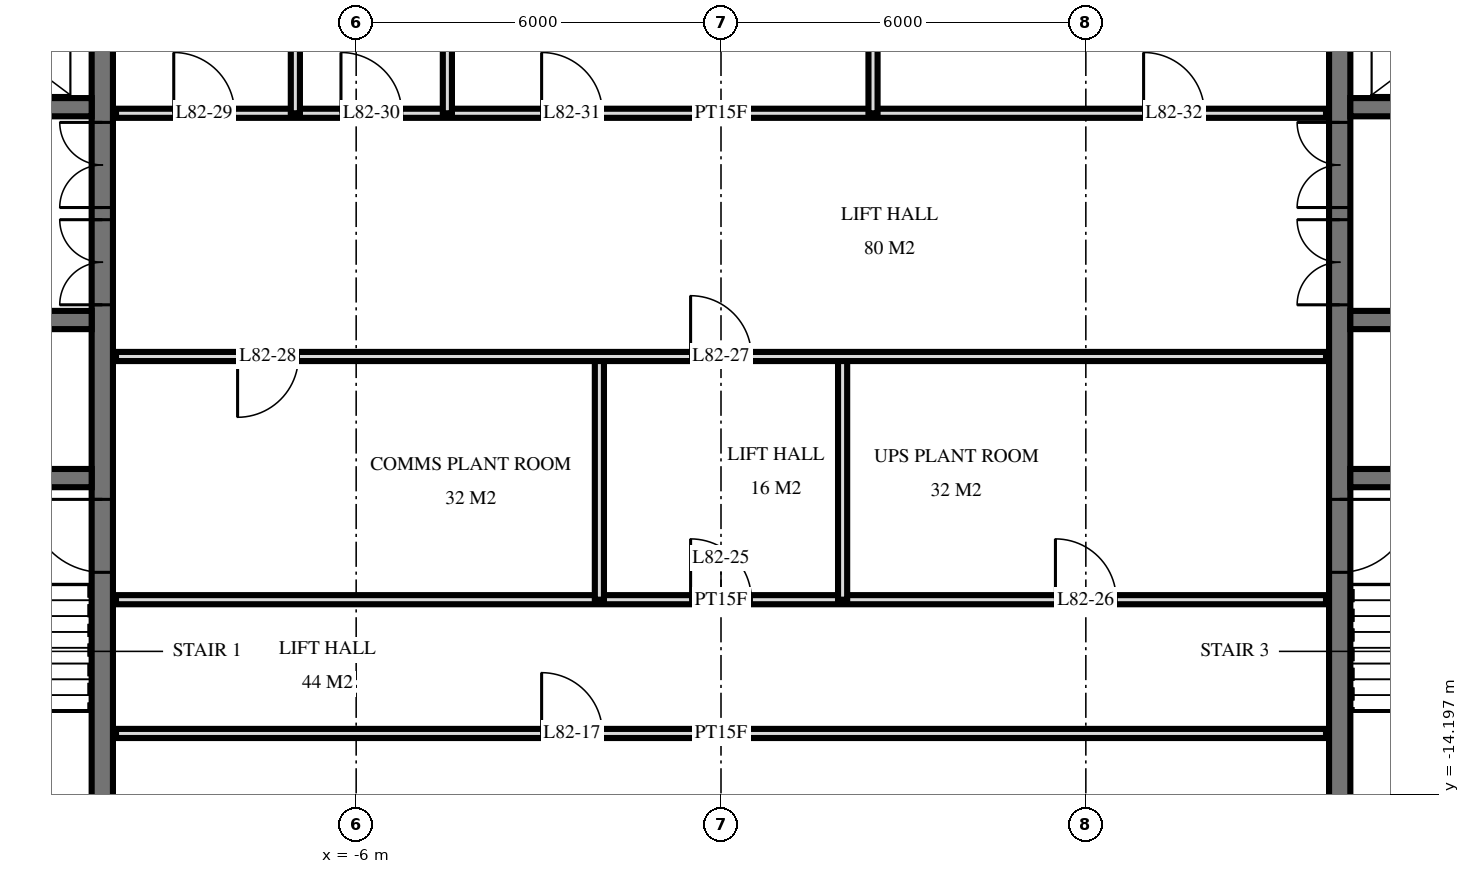
"""IFC4 building model, lengths in metres.
Left out: names, types, materials, properties, quantities, classifications, styles, units other than length and angle.
Written with IfcOpenShell. Run it as: python <this file> out.ifc"""

import sys

from ifc_helpers import new_model, si_unit, direction, frame, frame_2d, origin, place, context, subcontext, project, spatial, rectangle, extrude, element, fill, save


model = new_model("IFC4")
c1 = context("Model", 3, precision=1e-05, world=origin(), true_north=direction((0.0, 1.0)))
c2 = subcontext(c1, "Body", "Model", "MODEL_VIEW")
j1 = project(units=[si_unit("LENGTHUNIT", "METRE"), si_unit("PLANEANGLEUNIT", "RADIAN")], contexts=[c1])
p1 = place(None, origin())
s1 = spatial("IfcSite", under=j1, at=p1, CompositionType="ELEMENT")
p2 = place(p1, origin())
s2 = spatial("IfcBuilding", under=s1, at=p2, CompositionType="ELEMENT")
p3 = place(p2, frame((0.0, 0.0, 308.6)))
s3 = spatial("IfcBuildingStorey", under=s2, at=p3, CompositionType="ELEMENT", Elevation=308.6)
p4 = place(p3, frame((-10.175, -14.55, 0.0), z_axis=(0.0, 0.0, 1.0), x_axis=(0.0, 1.0, 0.0)))
e1 = element("IfcWall", 1, at=p4, inside=s3, PredefinedType="SHEAR", context=c2, shape_type="SweptSolid", body=[
    extrude(rectangle(XDim=14.1, YDim=0.35, at=frame_2d((7.05, 0.0))), origin(), (0.0, 0.0, 1.0), 6.0),
])
p5 = place(p4, frame((8.4, 0.0, 0.0)))
e2 = element("IfcOpeningElement", 2, at=p5, cuts=e1, PredefinedType="OPENING", context=c2, shape_type="SweptSolid", body=[
    extrude(rectangle(XDim=1.4, YDim=2.4, at=frame_2d((0.7, 1.2))), frame((0.0, 0.185, 0.0), z_axis=(0.0, -1.0, 0.0), x_axis=(1.0, 0.0, 0.0)), (0.0, 0.0, 1.0), 0.37),
])
p6 = place(p4, frame((10.0, 0.0, 0.0)))
e3 = element("IfcOpeningElement", 3, at=p6, cuts=e1, PredefinedType="OPENING", context=c2, shape_type="SweptSolid", body=[
    extrude(rectangle(XDim=1.4, YDim=2.4, at=frame_2d((0.7, 1.2))), frame((0.0, 0.185, 0.0), z_axis=(0.0, -1.0, 0.0), x_axis=(1.0, 0.0, 0.0)), (0.0, 0.0, 1.0), 0.37),
])
p7 = place(p4, frame((4.0, 0.0, 0.0)))
e4 = element("IfcOpeningElement", 4, at=p7, cuts=e1, PredefinedType="OPENING", context=c2, shape_type="SweptSolid", body=[
    extrude(rectangle(XDim=1.2, YDim=2.1, at=frame_2d((0.6, 1.05))), frame((0.0, 0.185, 0.0), z_axis=(0.0, -1.0, 0.0), x_axis=(1.0, 0.0, 0.0)), (0.0, 0.0, 1.0), 0.37),
])
p8 = place(p3, frame((-19.05, -2.9, 0.0), z_axis=(0.0, 0.0, 1.0), x_axis=(1.0, 0.0, 0.0)))
e5 = element("IfcWall", 5, at=p8, inside=s3, PredefinedType="SHEAR", context=c2, shape_type="SweptSolid", body=[
    extrude(rectangle(XDim=8.7, YDim=0.3, at=frame_2d((4.35, 0.0))), origin(), (0.0, 0.0, 1.0), 6.0),
])
p9 = place(p8, frame((6.8, 0.0, 0.0)))
e6 = element("IfcOpeningElement", 6, at=p9, cuts=e5, PredefinedType="OPENING", context=c2, shape_type="SweptSolid", body=[
    extrude(rectangle(XDim=1.1, YDim=2.1, at=frame_2d((0.55, 1.05))), frame((0.0, 0.16, 0.0), z_axis=(0.0, -1.0, 0.0), x_axis=(1.0, 0.0, 0.0)), (0.0, 0.0, 1.0), 0.32),
])
p10 = place(p8, frame((3.8, 0.0, 0.0)))
e7 = element("IfcOpeningElement", 7, at=p10, cuts=e5, PredefinedType="OPENING", context=c2, shape_type="SweptSolid", body=[
    extrude(rectangle(XDim=1.1, YDim=2.1, at=frame_2d((0.55, 1.05))), frame((0.0, 0.16, 0.0), z_axis=(0.0, -1.0, 0.0), x_axis=(1.0, 0.0, 0.0)), (0.0, 0.0, 1.0), 0.32),
])
p11 = place(p8, frame((0.9, 0.0, 0.0)))
e8 = element("IfcOpeningElement", 8, at=p11, cuts=e5, PredefinedType="OPENING", context=c2, shape_type="SweptSolid", body=[
    extrude(rectangle(XDim=0.9, YDim=2.1, at=frame_2d((0.45, 1.05))), frame((0.0, 0.16, 0.0), z_axis=(0.0, -1.0, 0.0), x_axis=(1.0, 0.0, 0.0)), (0.0, 0.0, 1.0), 0.32),
])
p12 = place(p3, frame((-19.05, -6.4, 0.0), z_axis=(0.0, 0.0, 1.0), x_axis=(1.0, 0.0, 0.0)))
e9 = element("IfcWall", 9, at=p12, inside=s3, PredefinedType="SHEAR", context=c2, shape_type="SweptSolid", body=[
    extrude(rectangle(XDim=8.7, YDim=0.3, at=frame_2d((4.35, 0.0))), origin(), (0.0, 0.0, 1.0), 6.0),
])
p13 = place(p12, frame((0.8, 0.0, 0.0)))
e10 = element("IfcOpeningElement", 10, at=p13, cuts=e9, PredefinedType="OPENING", context=c2, shape_type="SweptSolid", body=[
    extrude(rectangle(XDim=1.1, YDim=2.1, at=frame_2d((0.55, 1.05))), frame((0.0, 0.16, 0.0), z_axis=(0.0, -1.0, 0.0), x_axis=(1.0, 0.0, 0.0)), (0.0, 0.0, 1.0), 0.32),
])
p14 = place(p3, frame((-19.05, -9.0, 0.0), z_axis=(0.0, 0.0, 1.0), x_axis=(1.0, 0.0, 0.0)))
e11 = element("IfcWall", 11, at=p14, inside=s3, PredefinedType="SHEAR", context=c2, shape_type="SweptSolid", body=[
    extrude(rectangle(XDim=8.7, YDim=0.3, at=frame_2d((4.35, 0.0))), origin(), (0.0, 0.0, 1.0), 6.0),
])
p15 = place(p14, frame((3.8, 0.0, 0.0)))
e12 = element("IfcOpeningElement", 12, at=p15, cuts=e11, PredefinedType="OPENING", context=c2, shape_type="SweptSolid", body=[
    extrude(rectangle(XDim=1.1, YDim=2.1, at=frame_2d((0.55, 1.05))), frame((0.0, 0.16, 0.0), z_axis=(0.0, -1.0, 0.0), x_axis=(1.0, 0.0, 0.0)), (0.0, 0.0, 1.0), 0.32),
])
p16 = place(p3, frame((10.175, -14.55, 0.0), z_axis=(0.0, 0.0, 1.0), x_axis=(0.0, 1.0, 0.0)))
e13 = element("IfcWall", 13, at=p16, inside=s3, PredefinedType="SHEAR", context=c2, shape_type="SweptSolid", body=[
    extrude(rectangle(XDim=14.1, YDim=0.35, at=frame_2d((7.05, 0.0))), origin(), (0.0, 0.0, 1.0), 6.0),
])
p17 = place(p16, frame((8.4, 0.0, 0.0)))
e14 = element("IfcOpeningElement", 14, at=p17, cuts=e13, PredefinedType="OPENING", context=c2, shape_type="SweptSolid", body=[
    extrude(rectangle(XDim=1.4, YDim=2.4, at=frame_2d((0.7, 1.2))), frame((0.0, 0.185, 0.0), z_axis=(0.0, -1.0, 0.0), x_axis=(1.0, 0.0, 0.0)), (0.0, 0.0, 1.0), 0.37),
])
p18 = place(p16, frame((10.0, 0.0, 0.0)))
e15 = element("IfcOpeningElement", 15, at=p18, cuts=e13, PredefinedType="OPENING", context=c2, shape_type="SweptSolid", body=[
    extrude(rectangle(XDim=1.4, YDim=2.4, at=frame_2d((0.7, 1.2))), frame((0.0, 0.185, 0.0), z_axis=(0.0, -1.0, 0.0), x_axis=(1.0, 0.0, 0.0)), (0.0, 0.0, 1.0), 0.37),
])
p19 = place(p16, frame((4.0, 0.0, 0.0)))
e16 = element("IfcOpeningElement", 16, at=p19, cuts=e13, PredefinedType="OPENING", context=c2, shape_type="SweptSolid", body=[
    extrude(rectangle(XDim=1.2, YDim=2.1, at=frame_2d((0.6, 1.05))), frame((0.0, 0.185, 0.0), z_axis=(0.0, -1.0, 0.0), x_axis=(1.0, 0.0, 0.0)), (0.0, 0.0, 1.0), 0.37),
])
p20 = place(p3, frame((10.35, -2.9, 0.0), z_axis=(0.0, 0.0, 1.0), x_axis=(1.0, 0.0, 0.0)))
e17 = element("IfcWall", 17, at=p20, inside=s3, PredefinedType="SHEAR", context=c2, shape_type="SweptSolid", body=[
    extrude(rectangle(XDim=8.7, YDim=0.3, at=frame_2d((4.35, 0.0))), origin(), (0.0, 0.0, 1.0), 6.0),
])
p21 = place(p20, frame((0.8, 0.0, 0.0)))
e18 = element("IfcOpeningElement", 18, at=p21, cuts=e17, PredefinedType="OPENING", context=c2, shape_type="SweptSolid", body=[
    extrude(rectangle(XDim=1.1, YDim=2.1, at=frame_2d((0.55, 1.05))), frame((0.0, 0.16, 0.0), z_axis=(0.0, -1.0, 0.0), x_axis=(1.0, 0.0, 0.0)), (0.0, 0.0, 1.0), 0.32),
])
p22 = place(p20, frame((3.8, 0.0, 0.0)))
e19 = element("IfcOpeningElement", 19, at=p22, cuts=e17, PredefinedType="OPENING", context=c2, shape_type="SweptSolid", body=[
    extrude(rectangle(XDim=1.1, YDim=2.1, at=frame_2d((0.55, 1.05))), frame((0.0, 0.16, 0.0), z_axis=(0.0, -1.0, 0.0), x_axis=(1.0, 0.0, 0.0)), (0.0, 0.0, 1.0), 0.32),
])
p23 = place(p20, frame((6.9, 0.0, 0.0)))
e20 = element("IfcOpeningElement", 20, at=p23, cuts=e17, PredefinedType="OPENING", context=c2, shape_type="SweptSolid", body=[
    extrude(rectangle(XDim=0.9, YDim=2.1, at=frame_2d((0.45, 1.05))), frame((0.0, 0.16, 0.0), z_axis=(0.0, -1.0, 0.0), x_axis=(1.0, 0.0, 0.0)), (0.0, 0.0, 1.0), 0.32),
])
p24 = place(p3, frame((10.35, -6.4, 0.0), z_axis=(0.0, 0.0, 1.0), x_axis=(1.0, 0.0, 0.0)))
e21 = element("IfcWall", 21, at=p24, inside=s3, PredefinedType="SHEAR", context=c2, shape_type="SweptSolid", body=[
    extrude(rectangle(XDim=8.7, YDim=0.3, at=frame_2d((4.35, 0.0))), origin(), (0.0, 0.0, 1.0), 6.0),
])
p25 = place(p24, frame((6.8, 0.0, 0.0)))
e22 = element("IfcOpeningElement", 22, at=p25, cuts=e21, PredefinedType="OPENING", context=c2, shape_type="SweptSolid", body=[
    extrude(rectangle(XDim=1.1, YDim=2.1, at=frame_2d((0.55, 1.05))), frame((0.0, 0.16, 0.0), z_axis=(0.0, -1.0, 0.0), x_axis=(1.0, 0.0, 0.0)), (0.0, 0.0, 1.0), 0.32),
])
p26 = place(p3, frame((10.35, -9.0, 0.0), z_axis=(0.0, 0.0, 1.0), x_axis=(1.0, 0.0, 0.0)))
e23 = element("IfcWall", 23, at=p26, inside=s3, PredefinedType="SHEAR", context=c2, shape_type="SweptSolid", body=[
    extrude(rectangle(XDim=8.7, YDim=0.3, at=frame_2d((4.35, 0.0))), origin(), (0.0, 0.0, 1.0), 6.0),
])
p27 = place(p26, frame((3.8, 0.0, 0.0)))
e24 = element("IfcOpeningElement", 24, at=p27, cuts=e23, PredefinedType="OPENING", context=c2, shape_type="SweptSolid", body=[
    extrude(rectangle(XDim=1.1, YDim=2.1, at=frame_2d((0.55, 1.05))), frame((0.0, 0.16, 0.0), z_axis=(0.0, -1.0, 0.0), x_axis=(1.0, 0.0, 0.0)), (0.0, 0.0, 1.0), 0.32),
])
p28 = place(p3, frame((2.5, -3.0, 0.0), z_axis=(0.0, 0.0, 1.0), x_axis=(0.0, 1.0, 0.0)))
e25 = element("IfcWall", 25, at=p28, inside=s3, PredefinedType="PARTITIONING", context=c2, shape_type="SweptSolid", body=[
    extrude(rectangle(XDim=6.749, YDim=0.15, at=frame_2d((3.375, 0.0))), origin(), (0.0, 0.0, 1.0), 5.7),
])
for number, where, z_axis, x_axis in (
    (26, (2.0, -11.0, 0.0), (0.0, 0.0, 1.0), (0.0, 1.0, 0.0)),
    (27, (-2.0, -11.0, 0.0), (0.0, 0.0, 1.0), (0.0, 1.0, 0.0)),
):
    element("IfcWall", number, at=place(p3, frame(where, z_axis=z_axis, x_axis=x_axis)), inside=s3, PredefinedType="PARTITIONING", context=c2, shape_type="SweptSolid", body=[
        extrude(rectangle(XDim=4.0, YDim=0.15, at=frame_2d((2.0, 0.0))), origin(), (0.0, 0.0, 1.0), 5.7),
    ])
p29 = place(p3, frame((-4.5, -3.0, 0.0), z_axis=(0.0, 0.0, 1.0), x_axis=(0.0, 1.0, 0.0)))
e28 = element("IfcWall", 28, at=p29, inside=s3, PredefinedType="PLUMBINGWALL", context=c2, shape_type="SweptSolid", body=[
    extrude(rectangle(XDim=5.889, YDim=0.15, at=frame_2d((2.945, 0.0))), origin(), (0.0, 0.0, 1.0), 5.7),
])
p30 = place(p3, frame((-7.0, -3.0, 0.0), z_axis=(0.0, 0.0, 1.0), x_axis=(0.0, 1.0, 0.0)))
e29 = element("IfcWall", 29, at=p30, inside=s3, PredefinedType="PLUMBINGWALL", context=c2, shape_type="SweptSolid", body=[
    extrude(rectangle(XDim=5.583, YDim=0.15, at=frame_2d((2.791, 0.0))), origin(), (0.0, 0.0, 1.0), 5.7),
])
p31 = place(p3, frame((-9.95, -13.2, 0.0), z_axis=(0.0, 0.0, 1.0), x_axis=(1.0, 0.0, 0.0)))
e30 = element("IfcWall", 30, at=p31, inside=s3, PredefinedType="PARTITIONING", context=c2, shape_type="SweptSolid", body=[
    extrude(rectangle(XDim=19.9, YDim=0.15, at=frame_2d((9.95, 0.0))), origin(), (0.0, 0.0, 1.0), 5.7),
])
p32 = place(p31, frame((7.0, 0.0, 0.0)))
e31 = element("IfcOpeningElement", 31, at=p32, cuts=e30, PredefinedType="OPENING", context=c2, shape_type="SweptSolid", body=[
    extrude(rectangle(XDim=1.0, YDim=2.1, at=frame_2d((0.5, 1.05))), frame((0.0, 0.085, 0.0), z_axis=(0.0, -1.0, 0.0), x_axis=(1.0, 0.0, 0.0)), (0.0, 0.0, 1.0), 0.17),
])
p33 = place(p3, frame((-9.95, -11.0, 0.0), z_axis=(0.0, 0.0, 1.0), x_axis=(1.0, 0.0, 0.0)))
e32 = element("IfcWall", 32, at=p33, inside=s3, PredefinedType="PARTITIONING", context=c2, shape_type="SweptSolid", body=[
    extrude(rectangle(XDim=19.9, YDim=0.15, at=frame_2d((9.95, 0.0))), origin(), (0.0, 0.0, 1.0), 5.7),
])
p34 = place(p33, frame((9.45, 0.0, 0.0)))
e33 = element("IfcOpeningElement", 33, at=p34, cuts=e32, PredefinedType="OPENING", context=c2, shape_type="SweptSolid", body=[
    extrude(rectangle(XDim=1.0, YDim=2.1, at=frame_2d((0.5, 1.05))), frame((0.0, 0.085, 0.0), z_axis=(0.0, -1.0, 0.0), x_axis=(1.0, 0.0, 0.0)), (0.0, 0.0, 1.0), 0.17),
])
p35 = place(p33, frame((15.45, 0.0, 0.0)))
e34 = element("IfcOpeningElement", 34, at=p35, cuts=e32, PredefinedType="OPENING", context=c2, shape_type="SweptSolid", body=[
    extrude(rectangle(XDim=1.0, YDim=2.1, at=frame_2d((0.5, 1.05))), frame((0.0, 0.085, 0.0), z_axis=(0.0, -1.0, 0.0), x_axis=(1.0, 0.0, 0.0)), (0.0, 0.0, 1.0), 0.17),
])
p36 = place(p3, frame((-9.95, -7.0, 0.0), z_axis=(0.0, 0.0, 1.0), x_axis=(1.0, 0.0, 0.0)))
e35 = element("IfcWall", 35, at=p36, inside=s3, PredefinedType="PARTITIONING", context=c2, shape_type="SweptSolid", body=[
    extrude(rectangle(XDim=19.9, YDim=0.15, at=frame_2d((9.95, 0.0))), origin(), (0.0, 0.0, 1.0), 5.7),
])
p37 = place(p36, frame((9.45, 0.0, 0.0)))
e36 = element("IfcOpeningElement", 36, at=p37, cuts=e35, PredefinedType="OPENING", context=c2, shape_type="SweptSolid", body=[
    extrude(rectangle(XDim=1.0, YDim=2.1, at=frame_2d((0.5, 1.05))), frame((0.0, 0.085, 0.0), z_axis=(0.0, -1.0, 0.0), x_axis=(1.0, 0.0, 0.0)), (0.0, 0.0, 1.0), 0.17),
])
p38 = place(p36, frame((2.0, 0.0, 0.0)))
e37 = element("IfcOpeningElement", 37, at=p38, cuts=e35, PredefinedType="OPENING", context=c2, shape_type="SweptSolid", body=[
    extrude(rectangle(XDim=1.0, YDim=2.1, at=frame_2d((0.5, 1.05))), frame((0.0, 0.085, 0.0), z_axis=(0.0, -1.0, 0.0), x_axis=(1.0, 0.0, 0.0)), (0.0, 0.0, 1.0), 0.17),
])
p39 = place(p3, frame((-9.95, -3.0, 0.0), z_axis=(0.0, 0.0, 1.0), x_axis=(1.0, 0.0, 0.0)))
e38 = element("IfcWall", 38, at=p39, inside=s3, PredefinedType="PARTITIONING", context=c2, shape_type="SweptSolid", body=[
    extrude(rectangle(XDim=19.9, YDim=0.15, at=frame_2d((9.95, 0.0))), origin(), (0.0, 0.0, 1.0), 5.7),
])
p40 = place(p39, frame((0.95, 0.0, 0.0)))
e39 = element("IfcOpeningElement", 39, at=p40, cuts=e38, PredefinedType="OPENING", context=c2, shape_type="SweptSolid", body=[
    extrude(rectangle(XDim=1.0, YDim=2.1, at=frame_2d((0.5, 1.05))), frame((0.0, 0.085, 0.0), z_axis=(0.0, -1.0, 0.0), x_axis=(1.0, 0.0, 0.0)), (0.0, 0.0, 1.0), 0.17),
])
p41 = place(p39, frame((3.7, 0.0, 0.0)))
e40 = element("IfcOpeningElement", 40, at=p41, cuts=e38, PredefinedType="OPENING", context=c2, shape_type="SweptSolid", body=[
    extrude(rectangle(XDim=1.0, YDim=2.1, at=frame_2d((0.5, 1.05))), frame((0.0, 0.085, 0.0), z_axis=(0.0, -1.0, 0.0), x_axis=(1.0, 0.0, 0.0)), (0.0, 0.0, 1.0), 0.17),
])
p42 = place(p39, frame((7.0, 0.0, 0.0)))
e41 = element("IfcOpeningElement", 41, at=p42, cuts=e38, PredefinedType="OPENING", context=c2, shape_type="SweptSolid", body=[
    extrude(rectangle(XDim=1.0, YDim=2.1, at=frame_2d((0.5, 1.05))), frame((0.0, 0.085, 0.0), z_axis=(0.0, -1.0, 0.0), x_axis=(1.0, 0.0, 0.0)), (0.0, 0.0, 1.0), 0.17),
])
p43 = place(p39, frame((16.9, 0.0, 0.0)))
e42 = element("IfcOpeningElement", 42, at=p43, cuts=e38, PredefinedType="OPENING", context=c2, shape_type="SweptSolid", body=[
    extrude(rectangle(XDim=1.0, YDim=2.1, at=frame_2d((0.5, 1.05))), frame((0.0, 0.085, 0.0), z_axis=(0.0, -1.0, 0.0), x_axis=(1.0, 0.0, 0.0)), (0.0, 0.0, 1.0), 0.17),
])
p44 = place(p5, origin())
e43 = element("IfcDoor", 43, at=p44, inside=s3, OperationType="DOUBLE_DOOR_SINGLE_SWING", PredefinedType="DOOR", context=c2, shape_type="SweptSolid", body=[
    extrude(rectangle(XDim=1.4, YDim=2.4, at=frame_2d((0.7, 1.2))), frame((0.0, 0.025, 0.0), z_axis=(0.0, -1.0, 0.0), x_axis=(1.0, 0.0, 0.0)), (0.0, 0.0, 1.0), 0.05),
])
fill(e2, e43)
p45 = place(p6, origin())
e44 = element("IfcDoor", 44, at=p45, inside=s3, OperationType="DOUBLE_DOOR_SINGLE_SWING", PredefinedType="DOOR", context=c2, shape_type="SweptSolid", body=[
    extrude(rectangle(XDim=1.4, YDim=2.4, at=frame_2d((0.7, 1.2))), frame((0.0, 0.025, 0.0), z_axis=(0.0, -1.0, 0.0), x_axis=(1.0, 0.0, 0.0)), (0.0, 0.0, 1.0), 0.05),
])
fill(e3, e44)
p46 = place(p7, origin())
e45 = element("IfcDoor", 45, at=p46, inside=s3, OperationType="SINGLE_SWING_LEFT", PredefinedType="DOOR", context=c2, shape_type="SweptSolid", body=[
    extrude(rectangle(XDim=1.2, YDim=2.1, at=frame_2d((0.6, 1.05))), frame((0.0, 0.025, 0.0), z_axis=(0.0, -1.0, 0.0), x_axis=(1.0, 0.0, 0.0)), (0.0, 0.0, 1.0), 0.05),
])
fill(e4, e45)
p47 = place(p17, origin())
e46 = element("IfcDoor", 46, at=p47, inside=s3, OperationType="DOUBLE_DOOR_SINGLE_SWING", PredefinedType="DOOR", context=c2, shape_type="SweptSolid", body=[
    extrude(rectangle(XDim=1.4, YDim=2.4, at=frame_2d((0.7, 1.2))), frame((0.0, 0.025, 0.0), z_axis=(0.0, -1.0, 0.0), x_axis=(1.0, 0.0, 0.0)), (0.0, 0.0, 1.0), 0.05),
])
fill(e14, e46)
p48 = place(p18, origin())
e47 = element("IfcDoor", 47, at=p48, inside=s3, OperationType="DOUBLE_DOOR_SINGLE_SWING", PredefinedType="DOOR", context=c2, shape_type="SweptSolid", body=[
    extrude(rectangle(XDim=1.4, YDim=2.4, at=frame_2d((0.7, 1.2))), frame((0.0, 0.025, 0.0), z_axis=(0.0, -1.0, 0.0), x_axis=(1.0, 0.0, 0.0)), (0.0, 0.0, 1.0), 0.05),
])
fill(e15, e47)
p49 = place(p19, frame((0.6, 0.0, 0.0), z_axis=(0.0, 0.0, 1.0), x_axis=(-1.0, 0.0, 0.0)))
e48 = element("IfcDoor", 48, at=p49, inside=s3, OperationType="SINGLE_SWING_RIGHT", PredefinedType="DOOR", context=c2, shape_type="SweptSolid", body=[
    extrude(rectangle(XDim=1.2, YDim=2.1, at=frame_2d((0.0, 1.05))), frame((0.0, -0.025, 0.0), z_axis=(0.0, 1.0, 0.0), x_axis=(-1.0, 0.0, 0.0)), (0.0, 0.0, 1.0), 0.05),
])
fill(e16, e48)
p50 = place(p32, origin())
e49 = element("IfcDoor", 49, at=p50, inside=s3, OperationType="SINGLE_SWING_RIGHT", PredefinedType="DOOR", context=c2, shape_type="SweptSolid", body=[
    extrude(rectangle(XDim=1.0, YDim=2.1, at=frame_2d((0.5, 1.05))), frame((0.0, 0.025, 0.0), z_axis=(0.0, -1.0, 0.0), x_axis=(1.0, 0.0, 0.0)), (0.0, 0.0, 1.0), 0.05),
])
fill(e31, e49)
p51 = place(p34, origin())
e50 = element("IfcDoor", 50, at=p51, inside=s3, OperationType="SINGLE_SWING_RIGHT", PredefinedType="DOOR", context=c2, shape_type="SweptSolid", body=[
    extrude(rectangle(XDim=1.0, YDim=2.1, at=frame_2d((0.5, 1.05))), frame((0.0, 0.025, 0.0), z_axis=(0.0, -1.0, 0.0), x_axis=(1.0, 0.0, 0.0)), (0.0, 0.0, 1.0), 0.05),
])
fill(e33, e50)
p52 = place(p35, origin())
e51 = element("IfcDoor", 51, at=p52, inside=s3, OperationType="SINGLE_SWING_RIGHT", PredefinedType="DOOR", context=c2, shape_type="SweptSolid", body=[
    extrude(rectangle(XDim=1.0, YDim=2.1, at=frame_2d((0.5, 1.05))), frame((0.0, 0.025, 0.0), z_axis=(0.0, -1.0, 0.0), x_axis=(1.0, 0.0, 0.0)), (0.0, 0.0, 1.0), 0.05),
])
fill(e34, e51)
p53 = place(p37, origin())
e52 = element("IfcDoor", 52, at=p53, inside=s3, OperationType="SINGLE_SWING_RIGHT", PredefinedType="DOOR", context=c2, shape_type="SweptSolid", body=[
    extrude(rectangle(XDim=1.0, YDim=2.1, at=frame_2d((0.5, 1.05))), frame((0.0, 0.025, 0.0), z_axis=(0.0, -1.0, 0.0), x_axis=(1.0, 0.0, 0.0)), (0.0, 0.0, 1.0), 0.05),
])
fill(e36, e52)
p54 = place(p38, frame((0.5, 0.0, 0.0), z_axis=(0.0, 0.0, 1.0), x_axis=(-1.0, 0.0, 0.0)))
e53 = element("IfcDoor", 53, at=p54, inside=s3, OperationType="SINGLE_SWING_LEFT", PredefinedType="DOOR", context=c2, shape_type="SweptSolid", body=[
    extrude(rectangle(XDim=1.0, YDim=2.1, at=frame_2d((0.0, 1.05))), frame((0.0, -0.025, 0.0), z_axis=(0.0, 1.0, 0.0), x_axis=(-1.0, 0.0, 0.0)), (0.0, 0.0, 1.0), 0.05),
])
fill(e37, e53)
p55 = place(p40, origin())
e54 = element("IfcDoor", 54, at=p55, inside=s3, OperationType="SINGLE_SWING_RIGHT", PredefinedType="DOOR", context=c2, shape_type="SweptSolid", body=[
    extrude(rectangle(XDim=1.0, YDim=2.1, at=frame_2d((0.5, 1.05))), frame((0.0, 0.025, 0.0), z_axis=(0.0, -1.0, 0.0), x_axis=(1.0, 0.0, 0.0)), (0.0, 0.0, 1.0), 0.05),
])
fill(e39, e54)
p56 = place(p41, origin())
e55 = element("IfcDoor", 55, at=p56, inside=s3, OperationType="SINGLE_SWING_RIGHT", PredefinedType="DOOR", context=c2, shape_type="SweptSolid", body=[
    extrude(rectangle(XDim=1.0, YDim=2.1, at=frame_2d((0.5, 1.05))), frame((0.0, 0.025, 0.0), z_axis=(0.0, -1.0, 0.0), x_axis=(1.0, 0.0, 0.0)), (0.0, 0.0, 1.0), 0.05),
])
fill(e40, e55)
p57 = place(p42, origin())
e56 = element("IfcDoor", 56, at=p57, inside=s3, OperationType="SINGLE_SWING_RIGHT", PredefinedType="DOOR", context=c2, shape_type="SweptSolid", body=[
    extrude(rectangle(XDim=1.0, YDim=2.1, at=frame_2d((0.5, 1.05))), frame((0.0, 0.025, 0.0), z_axis=(0.0, -1.0, 0.0), x_axis=(1.0, 0.0, 0.0)), (0.0, 0.0, 1.0), 0.05),
])
fill(e41, e56)
p58 = place(p43, origin())
e57 = element("IfcDoor", 57, at=p58, inside=s3, OperationType="SINGLE_SWING_RIGHT", PredefinedType="DOOR", context=c2, shape_type="SweptSolid", body=[
    extrude(rectangle(XDim=1.0, YDim=2.1, at=frame_2d((0.5, 1.05))), frame((0.0, 0.025, 0.0), z_axis=(0.0, -1.0, 0.0), x_axis=(1.0, 0.0, 0.0)), (0.0, 0.0, 1.0), 0.05),
])
fill(e42, e57)
save(model, sys.argv[1])
